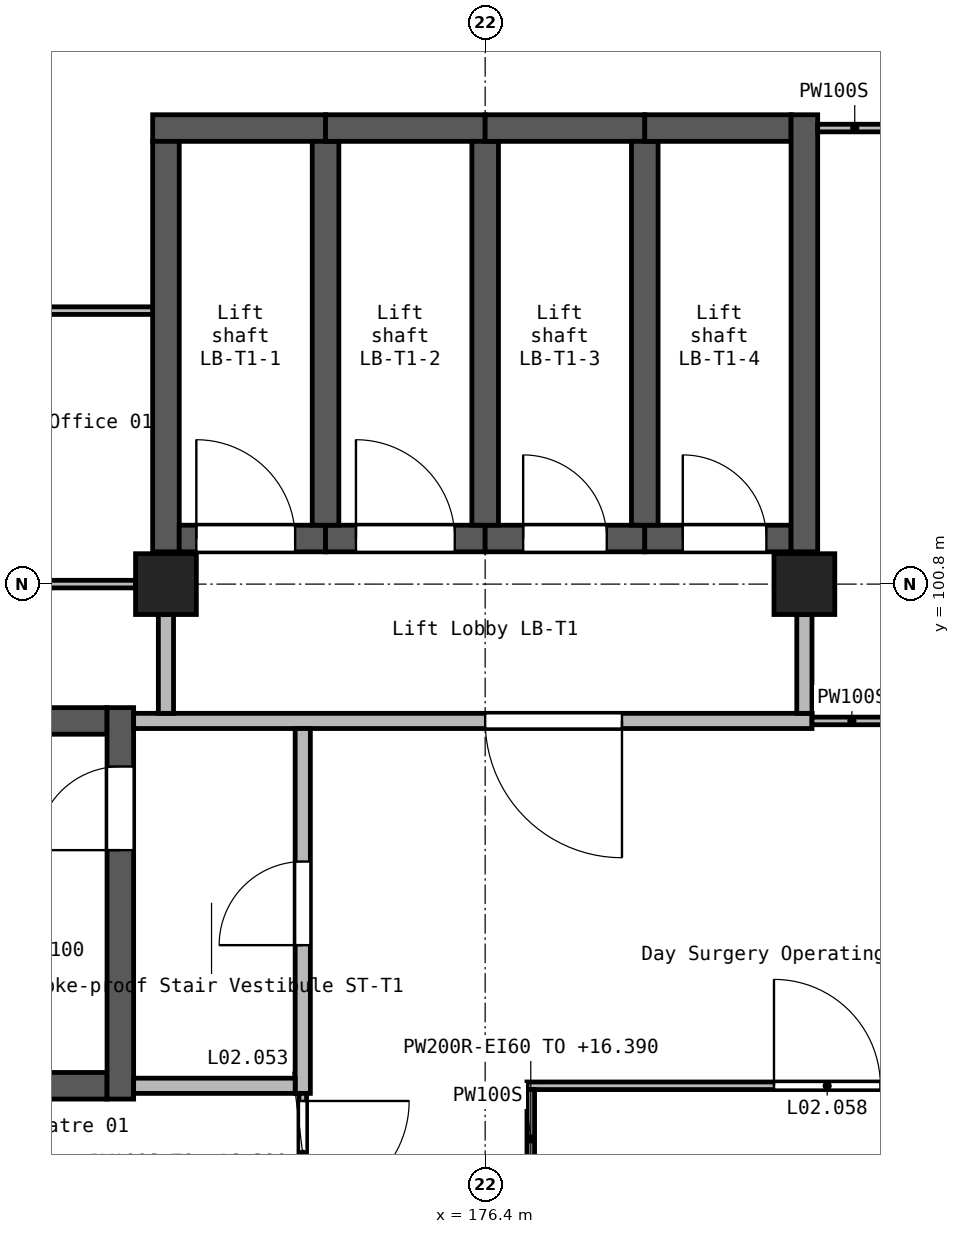
"""IFC4 building model, lengths in metres.
Left out: names, types, materials, properties, quantities, classifications, styles, units other than length and angle.
Written with IfcOpenShell. Run it as: python <this file> out.ifc"""

import sys

from ifc_helpers import new_model, si_unit, direction, frame, frame_2d, origin, origin_2d, place, context, subcontext, project, spatial, rectangle, extrude, element, fill, save


model = new_model("IFC4")
c1 = context("Model", 3, precision=1e-05, world=origin(), true_north=direction((0.0, 1.0)))
c2 = subcontext(c1, "Body", "Model", "MODEL_VIEW")
j1 = project(units=[si_unit("LENGTHUNIT", "METRE"), si_unit("PLANEANGLEUNIT", "RADIAN")], contexts=[c1])
p1 = place(None, origin())
s1 = spatial("IfcSite", under=j1, at=p1, CompositionType="ELEMENT")
p2 = place(p1, origin())
s2 = spatial("IfcBuilding", under=s1, at=p2, CompositionType="ELEMENT")
p3 = place(p2, frame((0.0, 0.0, 12.6)))
s3 = spatial("IfcBuildingStorey", under=s2, at=p3, CompositionType="ELEMENT", Elevation=12.6)
for number, where, z_axis, x_axis in (
    (1, (172.2, 100.8, 0.0), (0.0, 0.0, 1.0), (1.0, 0.0, 0.0)),
    (2, (180.6, 100.8, 0.0), (0.0, 0.0, 1.0), (1.0, 0.0, 0.0)),
):
    element("IfcColumn", number, at=place(p3, frame(where, z_axis=z_axis, x_axis=x_axis)), inside=s3, PredefinedType="COLUMN", context=c2, shape_type="SweptSolid", body=[
        extrude(rectangle(XDim=0.8, YDim=0.8, at=origin_2d()), origin(), (0.0, 0.0, 1.0), 6.31),
    ])
p4 = place(p3, frame((163.625, 99.0, 0.0), z_axis=(0.0, 0.0, 1.0), x_axis=(1.0, 0.0, 0.0)))
e3 = element("IfcWall", 3, at=p4, inside=s3, PredefinedType="SHEAR", context=c2, shape_type="SweptSolid", body=[
    extrude(rectangle(XDim=7.8, YDim=0.35, at=frame_2d((3.9, 0.0))), origin(), (0.0, 0.0, 1.0), 4.2),
])
p5 = place(p3, frame((163.975, 94.2, 0.0), z_axis=(0.0, 0.0, 1.0), x_axis=(1.0, 0.0, 0.0)))
e4 = element("IfcWall", 4, at=p5, inside=s3, PredefinedType="SHEAR", context=c2, shape_type="SweptSolid", body=[
    extrude(rectangle(XDim=7.45, YDim=0.35, at=frame_2d((3.725, 0.0))), origin(), (0.0, 0.0, 1.0), 4.2),
])
p6 = place(p3, frame((171.6, 94.025, 0.0), z_axis=(0.0, 0.0, 1.0), x_axis=(0.0, 1.0, 0.0)))
e5 = element("IfcWall", 5, at=p6, inside=s3, PredefinedType="SHEAR", context=c2, shape_type="SweptSolid", body=[
    extrude(rectangle(XDim=5.15, YDim=0.35, at=frame_2d((2.575, 0.0))), origin(), (0.0, 0.0, 1.0), 4.2),
])
p7 = place(p6, frame((3.275, 0.0, 0.0)))
e6 = element("IfcOpeningElement", 6, at=p7, cuts=e5, PredefinedType="OPENING", context=c2, shape_type="SweptSolid", body=[
    extrude(rectangle(XDim=1.1, YDim=2.1, at=frame_2d((0.55, 1.05))), frame((0.0, 0.185, 0.0), z_axis=(0.0, -1.0, 0.0), x_axis=(1.0, 0.0, 0.0)), (0.0, 0.0, 1.0), 0.37),
])
p8 = place(p3, frame((172.025, 106.8, 0.0), z_axis=(0.0, 0.0, 1.0), x_axis=(1.0, 0.0, 0.0)))
e7 = element("IfcWall", 7, at=p8, inside=s3, PredefinedType="SHEAR", context=c2, shape_type="SweptSolid", body=[
    extrude(rectangle(XDim=2.275, YDim=0.35, at=frame_2d((1.138, 0.0))), origin(), (0.0, 0.0, 1.0), 4.2),
])
p9 = place(p3, frame((172.2, 101.225, 0.0), z_axis=(0.0, 0.0, 1.0), x_axis=(0.0, 1.0, 0.0)))
e8 = element("IfcWall", 8, at=p9, inside=s3, PredefinedType="SHEAR", context=c2, shape_type="SweptSolid", body=[
    extrude(rectangle(XDim=5.4, YDim=0.35, at=frame_2d((2.7, 0.0))), origin(), (0.0, 0.0, 1.0), 4.2),
])
p10 = place(p3, frame((172.375, 101.4, 0.0), z_axis=(0.0, 0.0, 1.0), x_axis=(1.0, 0.0, 0.0)))
e9 = element("IfcWall", 9, at=p10, inside=s3, PredefinedType="SHEAR", context=c2, shape_type="SweptSolid", body=[
    extrude(rectangle(XDim=1.925, YDim=0.35, at=frame_2d((0.962, 0.0))), origin(), (0.0, 0.0, 1.0), 4.2),
])
p11 = place(p10, frame((0.225, 0.0, 0.0)))
e10 = element("IfcOpeningElement", 10, at=p11, cuts=e9, PredefinedType="OPENING", context=c2, shape_type="SweptSolid", body=[
    extrude(rectangle(XDim=1.3, YDim=2.1, at=frame_2d((0.65, 1.05))), frame((0.0, 0.185, 0.0), z_axis=(0.0, -1.0, 0.0), x_axis=(1.0, 0.0, 0.0)), (0.0, 0.0, 1.0), 0.37),
])
p12 = place(p3, frame((174.3, 101.4, 0.0), z_axis=(0.0, 0.0, 1.0), x_axis=(1.0, 0.0, 0.0)))
e11 = element("IfcWall", 11, at=p12, inside=s3, PredefinedType="SHEAR", context=c2, shape_type="SweptSolid", body=[
    extrude(rectangle(XDim=2.1, YDim=0.35, at=frame_2d((1.05, 0.0))), origin(), (0.0, 0.0, 1.0), 4.2),
])
p13 = place(p12, frame((0.4, 0.0, 0.0)))
e12 = element("IfcOpeningElement", 12, at=p13, cuts=e11, PredefinedType="OPENING", context=c2, shape_type="SweptSolid", body=[
    extrude(rectangle(XDim=1.3, YDim=2.1, at=frame_2d((0.65, 1.05))), frame((0.0, 0.185, 0.0), z_axis=(0.0, -1.0, 0.0), x_axis=(1.0, 0.0, 0.0)), (0.0, 0.0, 1.0), 0.37),
])
p14 = place(p3, frame((174.3, 101.575, 0.0), z_axis=(0.0, 0.0, 1.0), x_axis=(0.0, 1.0, 0.0)))
e13 = element("IfcWall", 13, at=p14, inside=s3, PredefinedType="SHEAR", context=c2, shape_type="SweptSolid", body=[
    extrude(rectangle(XDim=5.05, YDim=0.35, at=frame_2d((2.525, 0.0))), origin(), (0.0, 0.0, 1.0), 4.2),
])
p15 = place(p3, frame((174.3, 106.8, 0.0), z_axis=(0.0, 0.0, 1.0), x_axis=(1.0, 0.0, 0.0)))
e14 = element("IfcWall", 14, at=p15, inside=s3, PredefinedType="SHEAR", context=c2, shape_type="SweptSolid", body=[
    extrude(rectangle(XDim=2.1, YDim=0.35, at=frame_2d((1.05, 0.0))), origin(), (0.0, 0.0, 1.0), 4.2),
])
p16 = place(p3, frame((176.4, 101.4, 0.0), z_axis=(0.0, 0.0, 1.0), x_axis=(1.0, 0.0, 0.0)))
e15 = element("IfcWall", 15, at=p16, inside=s3, PredefinedType="SHEAR", context=c2, shape_type="SweptSolid", body=[
    extrude(rectangle(XDim=2.1, YDim=0.35, at=frame_2d((1.05, 0.0))), origin(), (0.0, 0.0, 1.0), 4.2),
])
p17 = place(p16, frame((0.5, 0.0, 0.0)))
e16 = element("IfcOpeningElement", 16, at=p17, cuts=e15, PredefinedType="OPENING", context=c2, shape_type="SweptSolid", body=[
    extrude(rectangle(XDim=1.1, YDim=2.1, at=frame_2d((0.55, 1.05))), frame((0.0, 0.185, 0.0), z_axis=(0.0, -1.0, 0.0), x_axis=(1.0, 0.0, 0.0)), (0.0, 0.0, 1.0), 0.37),
])
p18 = place(p3, frame((176.4, 101.575, 0.0), z_axis=(0.0, 0.0, 1.0), x_axis=(0.0, 1.0, 0.0)))
e17 = element("IfcWall", 17, at=p18, inside=s3, PredefinedType="SHEAR", context=c2, shape_type="SweptSolid", body=[
    extrude(rectangle(XDim=5.05, YDim=0.35, at=frame_2d((2.525, 0.0))), origin(), (0.0, 0.0, 1.0), 4.2),
])
p19 = place(p3, frame((176.4, 106.8, 0.0), z_axis=(0.0, 0.0, 1.0), x_axis=(1.0, 0.0, 0.0)))
e18 = element("IfcWall", 18, at=p19, inside=s3, PredefinedType="SHEAR", context=c2, shape_type="SweptSolid", body=[
    extrude(rectangle(XDim=2.1, YDim=0.35, at=frame_2d((1.05, 0.0))), origin(), (0.0, 0.0, 1.0), 4.2),
])
p20 = place(p3, frame((178.5, 101.4, 0.0), z_axis=(0.0, 0.0, 1.0), x_axis=(1.0, 0.0, 0.0)))
e19 = element("IfcWall", 19, at=p20, inside=s3, PredefinedType="SHEAR", context=c2, shape_type="SweptSolid", body=[
    extrude(rectangle(XDim=1.925, YDim=0.35, at=frame_2d((0.962, 0.0))), origin(), (0.0, 0.0, 1.0), 4.2),
])
p21 = place(p20, frame((0.5, 0.0, 0.0)))
e20 = element("IfcOpeningElement", 20, at=p21, cuts=e19, PredefinedType="OPENING", context=c2, shape_type="SweptSolid", body=[
    extrude(rectangle(XDim=1.1, YDim=2.1, at=frame_2d((0.55, 1.05))), frame((0.0, 0.185, 0.0), z_axis=(0.0, -1.0, 0.0), x_axis=(1.0, 0.0, 0.0)), (0.0, 0.0, 1.0), 0.37),
])
p22 = place(p3, frame((178.5, 101.575, 0.0), z_axis=(0.0, 0.0, 1.0), x_axis=(0.0, 1.0, 0.0)))
e21 = element("IfcWall", 21, at=p22, inside=s3, PredefinedType="SHEAR", context=c2, shape_type="SweptSolid", body=[
    extrude(rectangle(XDim=5.05, YDim=0.35, at=frame_2d((2.525, 0.0))), origin(), (0.0, 0.0, 1.0), 4.2),
])
p23 = place(p3, frame((178.5, 106.8, 0.0), z_axis=(0.0, 0.0, 1.0), x_axis=(1.0, 0.0, 0.0)))
e22 = element("IfcWall", 22, at=p23, inside=s3, PredefinedType="SHEAR", context=c2, shape_type="SweptSolid", body=[
    extrude(rectangle(XDim=1.925, YDim=0.35, at=frame_2d((0.962, 0.0))), origin(), (0.0, 0.0, 1.0), 4.2),
])
p24 = place(p3, frame((180.6, 101.225, 0.0), z_axis=(0.0, 0.0, 1.0), x_axis=(0.0, 1.0, 0.0)))
e23 = element("IfcWall", 23, at=p24, inside=s3, PredefinedType="SHEAR", context=c2, shape_type="SweptSolid", body=[
    extrude(rectangle(XDim=5.75, YDim=0.35, at=frame_2d((2.875, 0.0))), origin(), (0.0, 0.0, 1.0), 4.2),
])
p25 = place(p3, frame((180.7, 99.0, 0.0), z_axis=(0.0, 0.0, 1.0), x_axis=(-1.0, 0.0, 0.0)))
e24 = element("IfcWall", 24, at=p25, inside=s3, PredefinedType="SOLIDWALL", context=c2, shape_type="SweptSolid", body=[
    extrude(rectangle(XDim=8.925, YDim=0.2, at=frame_2d((4.462, 0.0))), origin(), (0.0, 0.0, 1.0), 3.85),
])
p26 = place(p25, frame((2.5, 0.0, 0.0)))
e25 = element("IfcOpeningElement", 25, at=p26, cuts=e24, PredefinedType="OPENING", context=c2, shape_type="SweptSolid", body=[
    extrude(rectangle(XDim=1.8, YDim=2.1, at=frame_2d((0.9, 1.05))), frame((0.0, 0.11, 0.0), z_axis=(0.0, -1.0, 0.0), x_axis=(1.0, 0.0, 0.0)), (0.0, 0.0, 1.0), 0.22),
])
p27 = place(p3, frame((174.0, 94.1, 0.0), z_axis=(0.0, 0.0, 1.0), x_axis=(0.0, 1.0, 0.0)))
e26 = element("IfcWall", 26, at=p27, inside=s3, PredefinedType="SOLIDWALL", context=c2, shape_type="SweptSolid", body=[
    extrude(rectangle(XDim=4.8, YDim=0.2, at=frame_2d((2.4, 0.0))), origin(), (0.0, 0.0, 1.0), 3.85),
])
p28 = place(p27, frame((1.95, 0.0, 0.0)))
e27 = element("IfcOpeningElement", 27, at=p28, cuts=e26, PredefinedType="OPENING", context=c2, shape_type="SweptSolid", body=[
    extrude(rectangle(XDim=1.1, YDim=2.1, at=frame_2d((0.55, 1.05))), frame((0.0, 0.11, 0.0), z_axis=(0.0, -1.0, 0.0), x_axis=(1.0, 0.0, 0.0)), (0.0, 0.0, 1.0), 0.22),
])
p29 = place(p3, frame((171.775, 94.2, 0.0), z_axis=(0.0, 0.0, 1.0), x_axis=(1.0, 0.0, 0.0)))
e28 = element("IfcWall", 28, at=p29, inside=s3, PredefinedType="SOLIDWALL", context=c2, shape_type="SweptSolid", body=[
    extrude(rectangle(XDim=2.125, YDim=0.2, at=frame_2d((1.062, 0.0))), origin(), (0.0, 0.0, 1.0), 3.85),
])
for number, where, z_axis, x_axis in (
    (29, (172.2, 99.1, 0.0), (0.0, 0.0, 1.0), (0.0, 1.0, 0.0)),
    (30, (180.6, 99.1, 0.0), (0.0, 0.0, 1.0), (0.0, 1.0, 0.0)),
):
    element("IfcWall", number, at=place(p3, frame(where, z_axis=z_axis, x_axis=x_axis)), inside=s3, PredefinedType="SOLIDWALL", context=c2, shape_type="SweptSolid", body=[
        extrude(rectangle(XDim=1.3, YDim=0.2, at=frame_2d((0.65, 0.0))), origin(), (0.0, 0.0, 1.0), 3.85),
    ])
p30 = place(p3, frame((174.0, 94.1, 0.0), z_axis=(0.0, 0.0, 1.0), x_axis=(0.0, -1.0, 0.0)))
e31 = element("IfcWall", 31, at=p30, inside=s3, PredefinedType="PARTITIONING", context=c2, shape_type="SweptSolid", body=[
    extrude(rectangle(XDim=18.2, YDim=0.1, at=frame_2d((9.1, 0.0))), origin(), (0.0, 0.0, 1.0), 3.79),
])
p31 = place(p30, frame((0.1, 0.0, 0.0)))
e32 = element("IfcOpeningElement", 32, at=p31, cuts=e31, PredefinedType="OPENING", context=c2, shape_type="SweptSolid", body=[
    extrude(rectangle(XDim=1.4, YDim=2.1, at=frame_2d((0.7, 1.05))), frame((0.0, 0.06, 0.0), z_axis=(0.0, -1.0, 0.0), x_axis=(1.0, 0.0, 0.0)), (0.0, 0.0, 1.0), 0.12),
])
p32 = place(p30, frame((3.7, 0.0, 0.0)))
e33 = element("IfcOpeningElement", 33, at=p32, cuts=e31, PredefinedType="OPENING", context=c2, shape_type="SweptSolid", body=[
    extrude(rectangle(XDim=1.4, YDim=2.1, at=frame_2d((0.7, 1.05))), frame((0.0, 0.06, 0.0), z_axis=(0.0, -1.0, 0.0), x_axis=(1.0, 0.0, 0.0)), (0.0, 0.0, 1.0), 0.12),
])
p33 = place(p30, frame((7.7, 0.0, 0.0)))
e34 = element("IfcOpeningElement", 34, at=p33, cuts=e31, PredefinedType="OPENING", context=c2, shape_type="SweptSolid", body=[
    extrude(rectangle(XDim=1.8, YDim=2.1, at=frame_2d((0.9, 1.05))), frame((0.0, 0.06, 0.0), z_axis=(0.0, -1.0, 0.0), x_axis=(1.0, 0.0, 0.0)), (0.0, 0.0, 1.0), 0.12),
])
p34 = place(p30, frame((11.8, 0.0, 0.0)))
e35 = element("IfcOpeningElement", 35, at=p34, cuts=e31, PredefinedType="OPENING", context=c2, shape_type="SweptSolid", body=[
    extrude(rectangle(XDim=1.4, YDim=2.1, at=frame_2d((0.7, 1.05))), frame((0.0, 0.06, 0.0), z_axis=(0.0, -1.0, 0.0), x_axis=(1.0, 0.0, 0.0)), (0.0, 0.0, 1.0), 0.12),
])
p35 = place(p30, frame((16.0, 0.0, 0.0)))
e36 = element("IfcOpeningElement", 36, at=p35, cuts=e31, PredefinedType="OPENING", context=c2, shape_type="SweptSolid", body=[
    extrude(rectangle(XDim=1.4, YDim=2.1, at=frame_2d((0.7, 1.05))), frame((0.0, 0.06, 0.0), z_axis=(0.0, -1.0, 0.0), x_axis=(1.0, 0.0, 0.0)), (0.0, 0.0, 1.0), 0.12),
])
p36 = place(p3, frame((176.95, 94.2, 0.0), z_axis=(0.0, 0.0, 1.0), x_axis=(1.0, 0.0, 0.0)))
e37 = element("IfcWall", 37, at=p36, inside=s3, PredefinedType="PARTITIONING", context=c2, shape_type="SweptSolid", body=[
    extrude(rectangle(XDim=14.4, YDim=0.1, at=frame_2d((7.2, 0.0))), origin(), (0.0, 0.0, 1.0), 3.85),
])
p37 = place(p36, frame((3.25, 0.0, 0.0)))
e38 = element("IfcOpeningElement", 38, at=p37, cuts=e37, PredefinedType="OPENING", context=c2, shape_type="SweptSolid", body=[
    extrude(rectangle(XDim=1.4, YDim=2.1, at=frame_2d((0.7, 1.05))), frame((0.0, 0.06, 0.0), z_axis=(0.0, -1.0, 0.0), x_axis=(1.0, 0.0, 0.0)), (0.0, 0.0, 1.0), 0.12),
])
p38 = place(p36, frame((10.45, 0.0, 0.0)))
e39 = element("IfcOpeningElement", 39, at=p38, cuts=e37, PredefinedType="OPENING", context=c2, shape_type="SweptSolid", body=[
    extrude(rectangle(XDim=1.4, YDim=2.1, at=frame_2d((0.7, 1.05))), frame((0.0, 0.06, 0.0), z_axis=(0.0, -1.0, 0.0), x_axis=(1.0, 0.0, 0.0)), (0.0, 0.0, 1.0), 0.12),
])
p39 = place(p3, frame((180.775, 106.8, 0.0), z_axis=(0.0, 0.0, 1.0), x_axis=(1.0, 0.0, 0.0)))
e40 = element("IfcWall", 40, at=p39, inside=s3, PredefinedType="PARTITIONING", context=c2, shape_type="SweptSolid", body=[
    extrude(rectangle(XDim=0.975, YDim=0.1, at=frame_2d((0.488, 0.0))), origin(), (0.0, 0.0, 1.0), 3.85),
])
p40 = place(p3, frame((164.2, 100.8, 0.0), z_axis=(0.0, 0.0, 1.0), x_axis=(1.0, 0.0, 0.0)))
e41 = element("IfcWall", 41, at=p40, inside=s3, PredefinedType="PARTITIONING", context=c2, shape_type="SweptSolid", body=[
    extrude(rectangle(XDim=7.6, YDim=0.1, at=frame_2d((3.8, 0.0))), origin(), (0.0, 0.0, 1.0), 3.85),
])
p41 = place(p40, frame((3.35, 0.0, 0.0)))
e42 = element("IfcOpeningElement", 42, at=p41, cuts=e41, PredefinedType="OPENING", context=c2, shape_type="SweptSolid", body=[
    extrude(rectangle(XDim=0.9, YDim=2.1, at=frame_2d((0.45, 1.05))), frame((0.0, 0.06, 0.0), z_axis=(0.0, -1.0, 0.0), x_axis=(1.0, 0.0, 0.0)), (0.0, 0.0, 1.0), 0.12),
])
p42 = place(p3, frame((164.1, 104.398, 0.0), z_axis=(0.0, 0.0, 1.0), x_axis=(1.0, 0.0, 0.0)))
e43 = element("IfcWall", 43, at=p42, inside=s3, PredefinedType="PARTITIONING", context=c2, shape_type="SweptSolid", body=[
    extrude(rectangle(XDim=7.925, YDim=0.1, at=frame_2d((3.962, 0.0))), origin(), (0.0, 0.0, 1.0), 3.85),
])
p43 = place(p42, frame((3.45, 0.0, 0.0)))
e44 = element("IfcOpeningElement", 44, at=p43, cuts=e43, PredefinedType="OPENING", context=c2, shape_type="SweptSolid", body=[
    extrude(rectangle(XDim=0.9, YDim=2.1, at=frame_2d((0.45, 1.05))), frame((0.0, 0.06, 0.0), z_axis=(0.0, -1.0, 0.0), x_axis=(1.0, 0.0, 0.0)), (0.0, 0.0, 1.0), 0.12),
])
p44 = place(p3, frame((177.0, 92.85, 0.0), z_axis=(0.0, 0.0, 1.0), x_axis=(0.0, 1.0, 0.0)))
e45 = element("IfcWall", 45, at=p44, inside=s3, PredefinedType="PARTITIONING", context=c2, shape_type="SweptSolid", body=[
    extrude(rectangle(XDim=1.3, YDim=0.1, at=frame_2d((0.65, 0.0))), origin(), (0.0, 0.0, 1.0), 3.85),
])
p45 = place(p3, frame((180.7, 99.0, 0.0), z_axis=(0.0, 0.0, 1.0), x_axis=(1.0, 0.0, 0.0)))
e46 = element("IfcWall", 46, at=p45, inside=s3, PredefinedType="PARTITIONING", context=c2, shape_type="SweptSolid", body=[
    extrude(rectangle(XDim=1.05, YDim=0.1, at=frame_2d((0.525, 0.0))), origin(), (0.0, 0.0, 1.0), 3.85),
])
p46 = place(p11, origin())
e47 = element("IfcDoor", 47, at=p46, inside=s3, OperationType="DOUBLE_DOOR_SLIDING", PredefinedType="DOOR", context=c2, shape_type="SweptSolid", body=[
    extrude(rectangle(XDim=1.3, YDim=2.1, at=frame_2d((0.65, 1.05))), frame((0.0, 0.025, 0.0), z_axis=(0.0, -1.0, 0.0), x_axis=(1.0, 0.0, 0.0)), (0.0, 0.0, 1.0), 0.05),
])
fill(e10, e47)
p47 = place(p13, origin())
e48 = element("IfcDoor", 48, at=p47, inside=s3, OperationType="DOUBLE_DOOR_SLIDING", PredefinedType="DOOR", context=c2, shape_type="SweptSolid", body=[
    extrude(rectangle(XDim=1.3, YDim=2.1, at=frame_2d((0.65, 1.05))), frame((0.0, 0.025, 0.0), z_axis=(0.0, -1.0, 0.0), x_axis=(1.0, 0.0, 0.0)), (0.0, 0.0, 1.0), 0.05),
])
fill(e12, e48)
p48 = place(p17, origin())
e49 = element("IfcDoor", 49, at=p48, inside=s3, OperationType="DOUBLE_DOOR_SLIDING", PredefinedType="DOOR", context=c2, shape_type="SweptSolid", body=[
    extrude(rectangle(XDim=1.1, YDim=2.1, at=frame_2d((0.55, 1.05))), frame((0.0, 0.025, 0.0), z_axis=(0.0, -1.0, 0.0), x_axis=(1.0, 0.0, 0.0)), (0.0, 0.0, 1.0), 0.05),
])
fill(e16, e49)
p49 = place(p21, origin())
e50 = element("IfcDoor", 50, at=p49, inside=s3, OperationType="DOUBLE_DOOR_SLIDING", PredefinedType="DOOR", context=c2, shape_type="SweptSolid", body=[
    extrude(rectangle(XDim=1.1, YDim=2.1, at=frame_2d((0.55, 1.05))), frame((0.0, 0.025, 0.0), z_axis=(0.0, -1.0, 0.0), x_axis=(1.0, 0.0, 0.0)), (0.0, 0.0, 1.0), 0.05),
])
fill(e20, e50)
p50 = place(p7, origin())
e51 = element("IfcDoor", 51, at=p50, inside=s3, OperationType="SINGLE_SWING_RIGHT", PredefinedType="DOOR", context=c2, shape_type="SweptSolid", body=[
    extrude(rectangle(XDim=1.1, YDim=2.1, at=frame_2d((0.55, 1.05))), frame((0.0, 0.025, 0.0), z_axis=(0.0, -1.0, 0.0), x_axis=(1.0, 0.0, 0.0)), (0.0, 0.0, 1.0), 0.05),
])
fill(e6, e51)
p51 = place(p28, origin())
e52 = element("IfcDoor", 52, at=p51, inside=s3, OperationType="SINGLE_SWING_RIGHT", PredefinedType="DOOR", context=c2, shape_type="SweptSolid", body=[
    extrude(rectangle(XDim=1.1, YDim=2.1, at=frame_2d((0.55, 1.05))), frame((0.0, 0.025, 0.0), z_axis=(0.0, -1.0, 0.0), x_axis=(1.0, 0.0, 0.0)), (0.0, 0.0, 1.0), 0.05),
])
fill(e27, e52)
p52 = place(p26, frame((1.8, 0.0, 0.0), z_axis=(0.0, 0.0, 1.0), x_axis=(-1.0, 0.0, 0.0)))
e53 = element("IfcDoor", 53, at=p52, inside=s3, OperationType="DOUBLE_DOOR_SINGLE_SWING", PredefinedType="DOOR", context=c2, shape_type="SweptSolid", body=[
    extrude(rectangle(XDim=1.8, YDim=2.1, at=frame_2d((0.9, 1.05))), frame((0.0, 0.025, 0.0), z_axis=(0.0, -1.0, 0.0), x_axis=(1.0, 0.0, 0.0)), (0.0, 0.0, 1.0), 0.05),
])
fill(e25, e53)
p53 = place(p31, frame((1.4, 0.0, 0.0), z_axis=(0.0, 0.0, 1.0), x_axis=(-1.0, 0.0, 0.0)))
e54 = element("IfcDoor", 54, at=p53, inside=s3, OperationType="DOUBLE_DOOR_SINGLE_SWING", PredefinedType="DOOR", context=c2, shape_type="SweptSolid", body=[
    extrude(rectangle(XDim=1.4, YDim=2.1, at=frame_2d((0.7, 1.05))), frame((0.0, 0.025, 0.0), z_axis=(0.0, -1.0, 0.0), x_axis=(1.0, 0.0, 0.0)), (0.0, 0.0, 1.0), 0.05),
])
fill(e32, e54)
p54 = place(p37, frame((1.4, 0.0, 0.0), z_axis=(0.0, 0.0, 1.0), x_axis=(-1.0, 0.0, 0.0)))
e55 = element("IfcDoor", 55, at=p54, inside=s3, OperationType="DOUBLE_DOOR_SINGLE_SWING", PredefinedType="DOOR", context=c2, shape_type="SweptSolid", body=[
    extrude(rectangle(XDim=1.4, YDim=2.1, at=frame_2d((0.7, 1.05))), frame((0.0, 0.025, 0.0), z_axis=(0.0, -1.0, 0.0), x_axis=(1.0, 0.0, 0.0)), (0.0, 0.0, 1.0), 0.05),
])
fill(e38, e55)
save(model, sys.argv[1])
